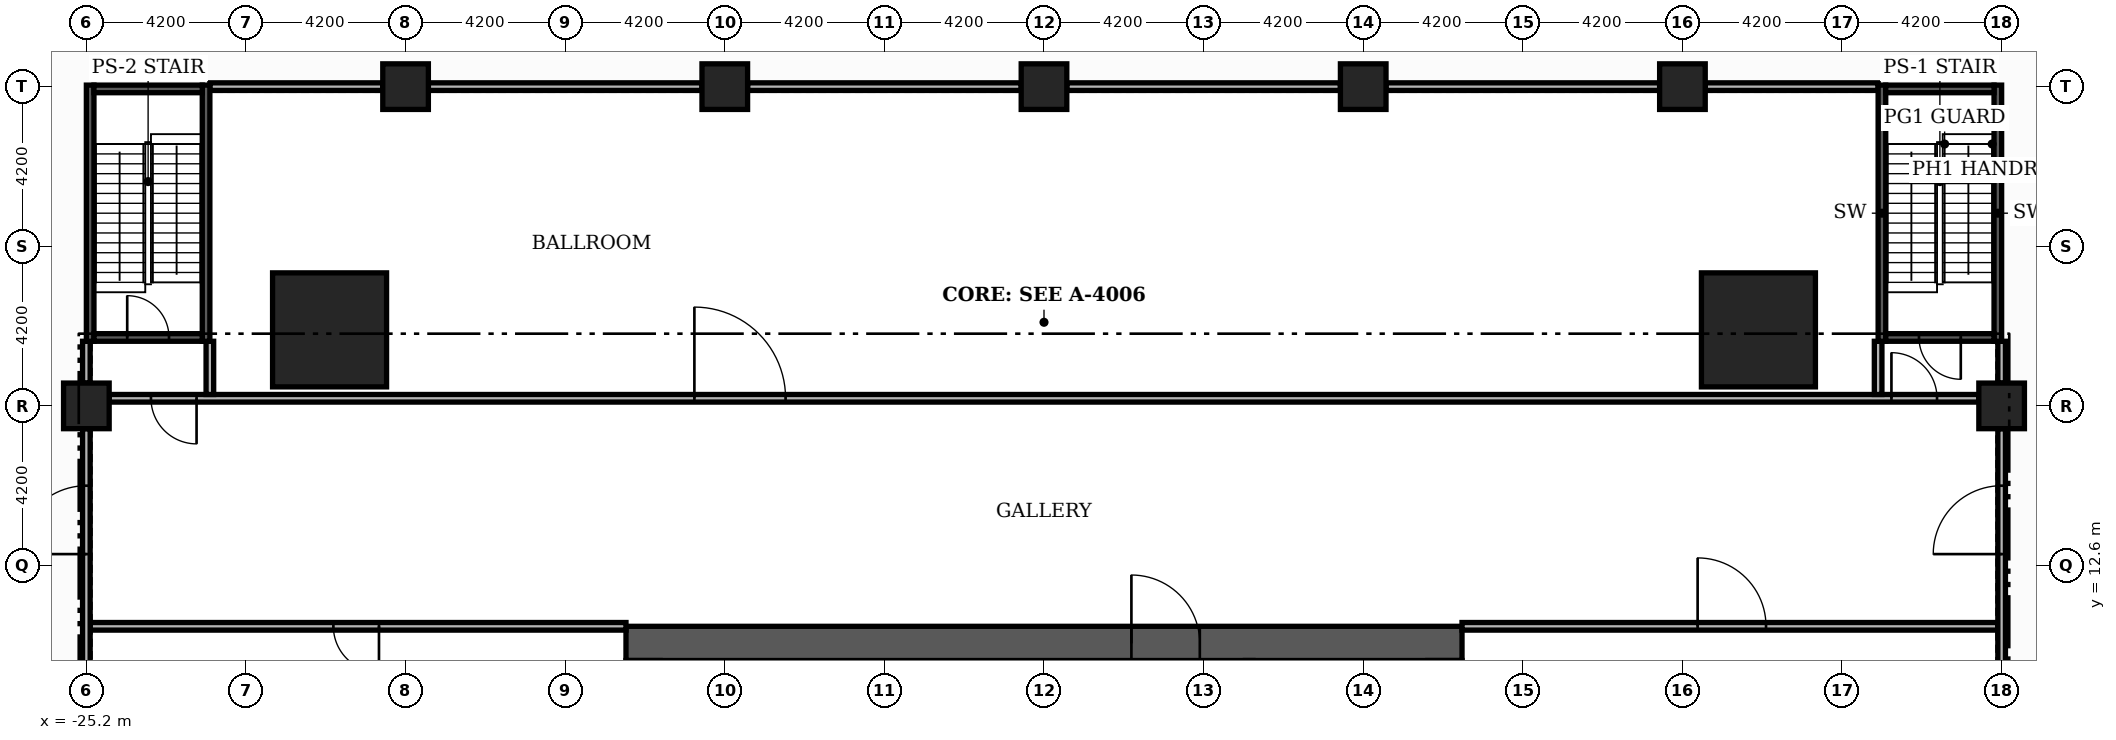
"""IFC4 building model, lengths in metres.
Left out: names, types, materials, properties, quantities, classifications, styles, units other than length and angle.
Written with IfcOpenShell. Run it as: python <this file> out.ifc"""

import sys

from ifc_helpers import new_model, si_unit, direction, frame, frame_2d, origin, origin_2d, place, context, subcontext, project, spatial, rectangle, extrude, element, fill, save


model = new_model("IFC4")
c1 = context("Model", 3, precision=1e-05, world=origin(), true_north=direction((0.0, 1.0)))
c2 = subcontext(c1, "Body", "Model", "MODEL_VIEW")
j1 = project(units=[si_unit("LENGTHUNIT", "METRE"), si_unit("PLANEANGLEUNIT", "RADIAN")], contexts=[c1])
p1 = place(None, origin())
s1 = spatial("IfcSite", under=j1, at=p1, CompositionType="ELEMENT")
p2 = place(p1, origin())
s2 = spatial("IfcBuilding", under=s1, at=p2, CompositionType="ELEMENT")
p3 = place(p2, frame((0.0, 0.0, 16.8)))
s3 = spatial("IfcBuildingStorey", under=s2, at=p3, CompositionType="ELEMENT", Elevation=16.8)
p4 = place(p3, frame((-11.0, 10.55, 0.0), z_axis=(0.0, 0.0, 1.0), x_axis=(1.0, 0.0, 0.0)))
e1 = element("IfcWall", 1, at=p4, inside=s3, PredefinedType="SHEAR", context=c2, shape_type="SweptSolid", body=[
    extrude(rectangle(XDim=22.0, YDim=0.9, at=frame_2d((11.0, 0.0))), origin(), (0.0, 0.0, 1.0), 4.98),
])
p5 = place(p4, frame((13.3, 0.0, 0.0)))
e2 = element("IfcOpeningElement", 2, at=p5, cuts=e1, PredefinedType="OPENING", context=c2, shape_type="SweptSolid", body=[
    extrude(rectangle(XDim=1.8, YDim=2.2, at=frame_2d((0.9, 1.1))), frame((0.0, 0.46, 0.0), z_axis=(0.0, -1.0, 0.0), x_axis=(1.0, 0.0, 0.0)), (0.0, 0.0, 1.0), 0.92),
])
for number, where, z_axis, x_axis in (
    (3, (18.8, 18.8, 0.0), (0.0, 0.0, 1.0), (1.0, 0.0, 0.0)),
    (4, (-18.8, 18.8, 0.0), (0.0, 0.0, 1.0), (1.0, 0.0, 0.0)),
):
    element("IfcColumn", number, at=place(p3, frame(where, z_axis=z_axis, x_axis=x_axis)), inside=s3, PredefinedType="COLUMN", context=c2, shape_type="SweptSolid", body=[
        extrude(rectangle(XDim=3.0, YDim=3.0, at=origin_2d()), origin(), (0.0, 0.0, 1.0), 5.4),
    ])
for number, where, z_axis, x_axis in (
    (5, (25.2, 16.8, 0.0), (0.0, 0.0, 1.0), (1.0, 0.0, 0.0)),
    (6, (0.0, 25.2, 0.0), (0.0, 0.0, 1.0), (1.0, 0.0, 0.0)),
    (7, (-8.4, 25.2, 0.0), (0.0, 0.0, 1.0), (1.0, 0.0, 0.0)),
    (8, (-16.8, 25.2, 0.0), (0.0, 0.0, 1.0), (1.0, 0.0, 0.0)),
    (9, (8.4, 25.2, 0.0), (0.0, 0.0, 1.0), (1.0, 0.0, 0.0)),
    (10, (16.8, 25.2, 0.0), (0.0, 0.0, 1.0), (1.0, 0.0, 0.0)),
    (11, (-25.2, 16.8, 0.0), (0.0, 0.0, 1.0), (1.0, 0.0, 0.0)),
):
    element("IfcColumn", number, at=place(p3, frame(where, z_axis=z_axis, x_axis=x_axis)), inside=s3, PredefinedType="COLUMN", context=c2, shape_type="SweptSolid", body=[
        extrude(rectangle(XDim=1.2, YDim=1.2, at=origin_2d()), origin(), (0.0, 0.0, 1.0), 5.4),
    ])
p6 = place(p3, frame((-25.1, 11.0, 0.0), z_axis=(0.0, 0.0, 1.0), x_axis=(1.0, 0.0, 0.0)))
e12 = element("IfcWall", 12, at=p6, inside=s3, PredefinedType="PARTITIONING", context=c2, shape_type="SweptSolid", body=[
    extrude(rectangle(XDim=14.1, YDim=0.2, at=frame_2d((7.05, 0.0))), origin(), (0.0, 0.0, 1.0), 4.98),
])
p7 = place(p6, frame((6.4, 0.0, 0.0)))
e13 = element("IfcOpeningElement", 13, at=p7, cuts=e12, PredefinedType="OPENING", context=c2, shape_type="SweptSolid", body=[
    extrude(rectangle(XDim=1.2, YDim=2.2, at=frame_2d((0.6, 1.1))), frame((0.0, 0.11, 0.0), z_axis=(0.0, -1.0, 0.0), x_axis=(1.0, 0.0, 0.0)), (0.0, 0.0, 1.0), 0.22),
])
p8 = place(p3, frame((11.0, 11.0, 0.0), z_axis=(0.0, 0.0, 1.0), x_axis=(1.0, 0.0, 0.0)))
e14 = element("IfcWall", 14, at=p8, inside=s3, PredefinedType="PARTITIONING", context=c2, shape_type="SweptSolid", body=[
    extrude(rectangle(XDim=14.1, YDim=0.2, at=frame_2d((7.05, 0.0))), origin(), (0.0, 0.0, 1.0), 4.98),
])
p9 = place(p8, frame((6.2, 0.0, 0.0)))
e15 = element("IfcOpeningElement", 15, at=p9, cuts=e14, PredefinedType="OPENING", context=c2, shape_type="SweptSolid", body=[
    extrude(rectangle(XDim=1.8, YDim=2.2, at=frame_2d((0.9, 1.1))), frame((0.0, 0.11, 0.0), z_axis=(0.0, -1.0, 0.0), x_axis=(1.0, 0.0, 0.0)), (0.0, 0.0, 1.0), 0.22),
])
p10 = place(p3, frame((-24.6, 17.0, 0.0), z_axis=(0.0, 0.0, 1.0), x_axis=(1.0, 0.0, 0.0)))
e16 = element("IfcWall", 16, at=p10, inside=s3, PredefinedType="PARTITIONING", context=c2, shape_type="SweptSolid", body=[
    extrude(rectangle(XDim=49.2, YDim=0.2, at=frame_2d((24.6, 0.0))), origin(), (0.0, 0.0, 1.0), 4.98),
])
p11 = place(p10, frame((1.1, 0.0, 0.0)))
e17 = element("IfcOpeningElement", 17, at=p11, cuts=e16, PredefinedType="OPENING", context=c2, shape_type="SweptSolid", body=[
    extrude(rectangle(XDim=1.2, YDim=2.2, at=frame_2d((0.6, 1.1))), frame((0.0, 0.11, 0.0), z_axis=(0.0, -1.0, 0.0), x_axis=(1.0, 0.0, 0.0)), (0.0, 0.0, 1.0), 0.22),
])
p12 = place(p10, frame((15.4, 0.0, 0.0)))
e18 = element("IfcOpeningElement", 18, at=p12, cuts=e16, PredefinedType="OPENING", context=c2, shape_type="SweptSolid", body=[
    extrude(rectangle(XDim=2.4, YDim=2.4, at=frame_2d((1.2, 1.2))), frame((0.0, 0.11, 0.0), z_axis=(0.0, -1.0, 0.0), x_axis=(1.0, 0.0, 0.0)), (0.0, 0.0, 1.0), 0.22),
])
p13 = place(p10, frame((46.9, 0.0, 0.0)))
e19 = element("IfcOpeningElement", 19, at=p13, cuts=e16, PredefinedType="OPENING", context=c2, shape_type="SweptSolid", body=[
    extrude(rectangle(XDim=1.2, YDim=2.2, at=frame_2d((0.6, 1.1))), frame((0.0, 0.11, 0.0), z_axis=(0.0, -1.0, 0.0), x_axis=(1.0, 0.0, 0.0)), (0.0, 0.0, 1.0), 0.22),
])
p14 = place(p3, frame((-21.95, 25.2, 0.0), z_axis=(0.0, 0.0, 1.0), x_axis=(1.0, 0.0, 0.0)))
e20 = element("IfcWall", 20, at=p14, inside=s3, PredefinedType="PARTITIONING", context=c2, shape_type="SweptSolid", body=[
    extrude(rectangle(XDim=4.55, YDim=0.2, at=frame_2d((2.275, 0.0))), origin(), (0.0, 0.0, 1.0), 4.78),
])
for number, where, z_axis, x_axis in (
    (21, (-16.2, 25.2, 0.0), (0.0, 0.0, 1.0), (1.0, 0.0, 0.0)),
    (22, (-7.8, 25.2, 0.0), (0.0, 0.0, 1.0), (1.0, 0.0, 0.0)),
    (23, (0.6, 25.2, 0.0), (0.0, 0.0, 1.0), (1.0, 0.0, 0.0)),
    (24, (9.0, 25.2, 0.0), (0.0, 0.0, 1.0), (1.0, 0.0, 0.0)),
):
    element("IfcWall", number, at=place(p3, frame(where, z_axis=z_axis, x_axis=x_axis)), inside=s3, PredefinedType="PARTITIONING", context=c2, shape_type="SweptSolid", body=[
        extrude(rectangle(XDim=7.2, YDim=0.2, at=frame_2d((3.6, 0.0))), origin(), (0.0, 0.0, 1.0), 4.78),
    ])
p15 = place(p3, frame((17.4, 25.2, 0.0), z_axis=(0.0, 0.0, 1.0), x_axis=(1.0, 0.0, 0.0)))
e25 = element("IfcWall", 25, at=p15, inside=s3, PredefinedType="PARTITIONING", context=c2, shape_type="SweptSolid", body=[
    extrude(rectangle(XDim=4.55, YDim=0.2, at=frame_2d((2.275, 0.0))), origin(), (0.0, 0.0, 1.0), 4.78),
])
p16 = place(p3, frame((-25.2, 9.0, 0.0), z_axis=(0.0, 0.0, 1.0), x_axis=(0.0, 1.0, 0.0)))
e26 = element("IfcWall", 26, at=p16, inside=s3, PredefinedType="PARTITIONING", context=c2, shape_type="SweptSolid", body=[
    extrude(rectangle(XDim=7.2, YDim=0.2, at=frame_2d((3.6, 0.0))), origin(), (0.0, 0.0, 1.0), 4.68),
])
p17 = place(p16, frame((3.9, 0.0, 0.0)))
e27 = element("IfcOpeningElement", 27, at=p17, cuts=e26, PredefinedType="OPENING", context=c2, shape_type="SweptSolid", body=[
    extrude(rectangle(XDim=1.8, YDim=2.2, at=frame_2d((0.9, 1.1))), frame((0.0, 0.11, 0.0), z_axis=(0.0, -1.0, 0.0), x_axis=(1.0, 0.0, 0.0)), (0.0, 0.0, 1.0), 0.22),
])
p18 = place(p3, frame((-25.2, 17.4, 0.0), z_axis=(0.0, 0.0, 1.0), x_axis=(0.0, 1.0, 0.0)))
e28 = element("IfcWall", 28, at=p18, inside=s3, PredefinedType="PARTITIONING", context=c2, shape_type="SweptSolid", body=[
    extrude(rectangle(XDim=1.1, YDim=0.2, at=frame_2d((0.55, 0.0))), origin(), (0.0, 0.0, 1.0), 4.68),
])
for number, where, z_axis, x_axis in (
    (29, (-21.95, 17.1, 0.0), (0.0, 0.0, 1.0), (0.0, 1.0, 0.0)),
    (30, (21.95, 17.1, 0.0), (0.0, 0.0, 1.0), (0.0, 1.0, 0.0)),
):
    element("IfcWall", number, at=place(p3, frame(where, z_axis=z_axis, x_axis=x_axis)), inside=s3, PredefinedType="PARTITIONING", context=c2, shape_type="SweptSolid", body=[
        extrude(rectangle(XDim=1.4, YDim=0.2, at=frame_2d((0.7, 0.0))), origin(), (0.0, 0.0, 1.0), 4.98),
    ])
p19 = place(p3, frame((25.2, 9.0, 0.0), z_axis=(0.0, 0.0, 1.0), x_axis=(0.0, 1.0, 0.0)))
e31 = element("IfcWall", 31, at=p19, inside=s3, PredefinedType="PARTITIONING", context=c2, shape_type="SweptSolid", body=[
    extrude(rectangle(XDim=7.2, YDim=0.2, at=frame_2d((3.6, 0.0))), origin(), (0.0, 0.0, 1.0), 4.68),
])
p20 = place(p19, frame((3.9, 0.0, 0.0)))
e32 = element("IfcOpeningElement", 32, at=p20, cuts=e31, PredefinedType="OPENING", context=c2, shape_type="SweptSolid", body=[
    extrude(rectangle(XDim=1.8, YDim=2.2, at=frame_2d((0.9, 1.1))), frame((0.0, 0.11, 0.0), z_axis=(0.0, -1.0, 0.0), x_axis=(1.0, 0.0, 0.0)), (0.0, 0.0, 1.0), 0.22),
])
p21 = place(p3, frame((25.2, 17.4, 0.0), z_axis=(0.0, 0.0, 1.0), x_axis=(0.0, 1.0, 0.0)))
e33 = element("IfcWall", 33, at=p21, inside=s3, PredefinedType="PARTITIONING", context=c2, shape_type="SweptSolid", body=[
    extrude(rectangle(XDim=1.1, YDim=0.2, at=frame_2d((0.55, 0.0))), origin(), (0.0, 0.0, 1.0), 4.68),
])
p22 = place(p3, frame((22.05, 18.5, 0.0), z_axis=(0.0, 0.0, 1.0), x_axis=(0.0, 1.0, 0.0)))
e34 = element("IfcWall", 34, at=p22, inside=s3, PredefinedType="SOLIDWALL", context=c2, shape_type="SweptSolid", body=[
    extrude(rectangle(XDim=6.74, YDim=0.2, at=frame_2d((3.37, 0.0))), origin(), (0.0, 0.0, 1.0), 4.98),
])
p23 = place(p3, frame((25.1, 18.5, 0.0), z_axis=(0.0, 0.0, 1.0), x_axis=(0.0, 1.0, 0.0)))
e35 = element("IfcWall", 35, at=p23, inside=s3, PredefinedType="SOLIDWALL", context=c2, shape_type="SweptSolid", body=[
    extrude(rectangle(XDim=6.74, YDim=0.2, at=frame_2d((3.37, 0.0))), origin(), (0.0, 0.0, 1.0), 4.68),
])
p24 = place(p3, frame((22.15, 18.6, 0.0), z_axis=(0.0, 0.0, 1.0), x_axis=(1.0, 0.0, 0.0)))
e36 = element("IfcWall", 36, at=p24, inside=s3, PredefinedType="SOLIDWALL", context=c2, shape_type="SweptSolid", body=[
    extrude(rectangle(XDim=2.85, YDim=0.2, at=frame_2d((1.425, 0.0))), origin(), (0.0, 0.0, 1.0), 4.98),
])
p25 = place(p24, frame((0.875, 0.0, 0.0)))
e37 = element("IfcOpeningElement", 37, at=p25, cuts=e36, PredefinedType="OPENING", context=c2, shape_type="SweptSolid", body=[
    extrude(rectangle(XDim=1.1, YDim=2.2, at=frame_2d((0.55, 1.1))), frame((0.0, 0.11, 0.0), z_axis=(0.0, -1.0, 0.0), x_axis=(1.0, 0.0, 0.0)), (0.0, 0.0, 1.0), 0.22),
])
p26 = place(p3, frame((22.15, 25.14, 0.0), z_axis=(0.0, 0.0, 1.0), x_axis=(1.0, 0.0, 0.0)))
e38 = element("IfcWall", 38, at=p26, inside=s3, PredefinedType="SOLIDWALL", context=c2, shape_type="SweptSolid", body=[
    extrude(rectangle(XDim=2.85, YDim=0.2, at=frame_2d((1.425, 0.0))), origin(), (0.0, 0.0, 1.0), 4.78),
])
p27 = place(p3, frame((-25.1, 18.5, 0.0), z_axis=(0.0, 0.0, 1.0), x_axis=(0.0, 1.0, 0.0)))
e39 = element("IfcWall", 39, at=p27, inside=s3, PredefinedType="SOLIDWALL", context=c2, shape_type="SweptSolid", body=[
    extrude(rectangle(XDim=6.74, YDim=0.2, at=frame_2d((3.37, 0.0))), origin(), (0.0, 0.0, 1.0), 4.68),
])
p28 = place(p3, frame((-22.05, 18.5, 0.0), z_axis=(0.0, 0.0, 1.0), x_axis=(0.0, 1.0, 0.0)))
e40 = element("IfcWall", 40, at=p28, inside=s3, PredefinedType="SOLIDWALL", context=c2, shape_type="SweptSolid", body=[
    extrude(rectangle(XDim=6.74, YDim=0.2, at=frame_2d((3.37, 0.0))), origin(), (0.0, 0.0, 1.0), 4.98),
])
p29 = place(p3, frame((-25.0, 18.6, 0.0), z_axis=(0.0, 0.0, 1.0), x_axis=(1.0, 0.0, 0.0)))
e41 = element("IfcWall", 41, at=p29, inside=s3, PredefinedType="SOLIDWALL", context=c2, shape_type="SweptSolid", body=[
    extrude(rectangle(XDim=2.85, YDim=0.2, at=frame_2d((1.425, 0.0))), origin(), (0.0, 0.0, 1.0), 4.98),
])
p30 = place(p29, frame((0.875, 0.0, 0.0)))
e42 = element("IfcOpeningElement", 42, at=p30, cuts=e41, PredefinedType="OPENING", context=c2, shape_type="SweptSolid", body=[
    extrude(rectangle(XDim=1.1, YDim=2.2, at=frame_2d((0.55, 1.1))), frame((0.0, 0.11, 0.0), z_axis=(0.0, -1.0, 0.0), x_axis=(1.0, 0.0, 0.0)), (0.0, 0.0, 1.0), 0.22),
])
p31 = place(p3, frame((-25.0, 25.14, 0.0), z_axis=(0.0, 0.0, 1.0), x_axis=(1.0, 0.0, 0.0)))
e43 = element("IfcWall", 43, at=p31, inside=s3, PredefinedType="SOLIDWALL", context=c2, shape_type="SweptSolid", body=[
    extrude(rectangle(XDim=2.85, YDim=0.2, at=frame_2d((1.425, 0.0))), origin(), (0.0, 0.0, 1.0), 4.78),
])
p32 = place(p5, origin())
e44 = element("IfcDoor", 44, at=p32, inside=s3, OperationType="DOUBLE_DOOR_SINGLE_SWING", PredefinedType="DOOR", context=c2, shape_type="SweptSolid", body=[
    extrude(rectangle(XDim=1.8, YDim=2.2, at=frame_2d((0.9, 1.1))), frame((0.0, 0.025, 0.0), z_axis=(0.0, -1.0, 0.0), x_axis=(1.0, 0.0, 0.0)), (0.0, 0.0, 1.0), 0.05),
])
fill(e2, e44)
p33 = place(p7, origin())
e45 = element("IfcDoor", 45, at=p33, inside=s3, OperationType="SINGLE_SWING_RIGHT", PredefinedType="DOOR", context=c2, shape_type="SweptSolid", body=[
    extrude(rectangle(XDim=1.2, YDim=2.2, at=frame_2d((0.6, 1.1))), frame((0.0, 0.025, 0.0), z_axis=(0.0, -1.0, 0.0), x_axis=(1.0, 0.0, 0.0)), (0.0, 0.0, 1.0), 0.05),
])
fill(e13, e45)
p34 = place(p9, origin())
e46 = element("IfcDoor", 46, at=p34, inside=s3, OperationType="DOUBLE_DOOR_SINGLE_SWING", PredefinedType="DOOR", context=c2, shape_type="SweptSolid", body=[
    extrude(rectangle(XDim=1.8, YDim=2.2, at=frame_2d((0.9, 1.1))), frame((0.0, 0.025, 0.0), z_axis=(0.0, -1.0, 0.0), x_axis=(1.0, 0.0, 0.0)), (0.0, 0.0, 1.0), 0.05),
])
fill(e15, e46)
p35 = place(p17, origin())
e47 = element("IfcDoor", 47, at=p35, inside=s3, OperationType="DOUBLE_DOOR_SINGLE_SWING", PredefinedType="DOOR", context=c2, shape_type="SweptSolid", body=[
    extrude(rectangle(XDim=1.8, YDim=2.2, at=frame_2d((0.9, 1.1))), frame((0.0, 0.025, 0.0), z_axis=(0.0, -1.0, 0.0), x_axis=(1.0, 0.0, 0.0)), (0.0, 0.0, 1.0), 0.05),
])
fill(e27, e47)
p36 = place(p20, origin())
e48 = element("IfcDoor", 48, at=p36, inside=s3, OperationType="DOUBLE_DOOR_SINGLE_SWING", PredefinedType="DOOR", context=c2, shape_type="SweptSolid", body=[
    extrude(rectangle(XDim=1.8, YDim=2.2, at=frame_2d((0.9, 1.1))), frame((0.0, 0.025, 0.0), z_axis=(0.0, -1.0, 0.0), x_axis=(1.0, 0.0, 0.0)), (0.0, 0.0, 1.0), 0.05),
])
fill(e32, e48)
p37 = place(p11, origin())
e49 = element("IfcDoor", 49, at=p37, inside=s3, OperationType="SINGLE_SWING_RIGHT", PredefinedType="DOOR", context=c2, shape_type="SweptSolid", body=[
    extrude(rectangle(XDim=1.2, YDim=2.2, at=frame_2d((0.6, 1.1))), frame((0.0, 0.025, 0.0), z_axis=(0.0, -1.0, 0.0), x_axis=(1.0, 0.0, 0.0)), (0.0, 0.0, 1.0), 0.05),
])
fill(e17, e49)
p38 = place(p12, origin())
e50 = element("IfcDoor", 50, at=p38, inside=s3, OperationType="DOUBLE_DOOR_SINGLE_SWING", PredefinedType="DOOR", context=c2, shape_type="SweptSolid", body=[
    extrude(rectangle(XDim=2.4, YDim=2.4, at=frame_2d((1.2, 1.2))), frame((0.0, 0.025, 0.0), z_axis=(0.0, -1.0, 0.0), x_axis=(1.0, 0.0, 0.0)), (0.0, 0.0, 1.0), 0.05),
])
fill(e18, e50)
p39 = place(p13, origin())
e51 = element("IfcDoor", 51, at=p39, inside=s3, OperationType="SINGLE_SWING_LEFT", PredefinedType="DOOR", context=c2, shape_type="SweptSolid", body=[
    extrude(rectangle(XDim=1.2, YDim=2.2, at=frame_2d((0.6, 1.1))), frame((0.0, 0.025, 0.0), z_axis=(0.0, -1.0, 0.0), x_axis=(1.0, 0.0, 0.0)), (0.0, 0.0, 1.0), 0.05),
])
fill(e19, e51)
p40 = place(p25, origin())
e52 = element("IfcDoor", 52, at=p40, inside=s3, OperationType="SINGLE_SWING_RIGHT", PredefinedType="DOOR", context=c2, shape_type="SweptSolid", body=[
    extrude(rectangle(XDim=1.1, YDim=2.2, at=frame_2d((0.55, 1.1))), frame((0.0, 0.025, 0.0), z_axis=(0.0, -1.0, 0.0), x_axis=(1.0, 0.0, 0.0)), (0.0, 0.0, 1.0), 0.05),
])
fill(e37, e52)
p41 = place(p30, origin())
e53 = element("IfcDoor", 53, at=p41, inside=s3, OperationType="SINGLE_SWING_LEFT", PredefinedType="DOOR", context=c2, shape_type="SweptSolid", body=[
    extrude(rectangle(XDim=1.1, YDim=2.2, at=frame_2d((0.55, 1.1))), frame((0.0, 0.025, 0.0), z_axis=(0.0, -1.0, 0.0), x_axis=(1.0, 0.0, 0.0)), (0.0, 0.0, 1.0), 0.05),
])
fill(e42, e53)
save(model, sys.argv[1])
